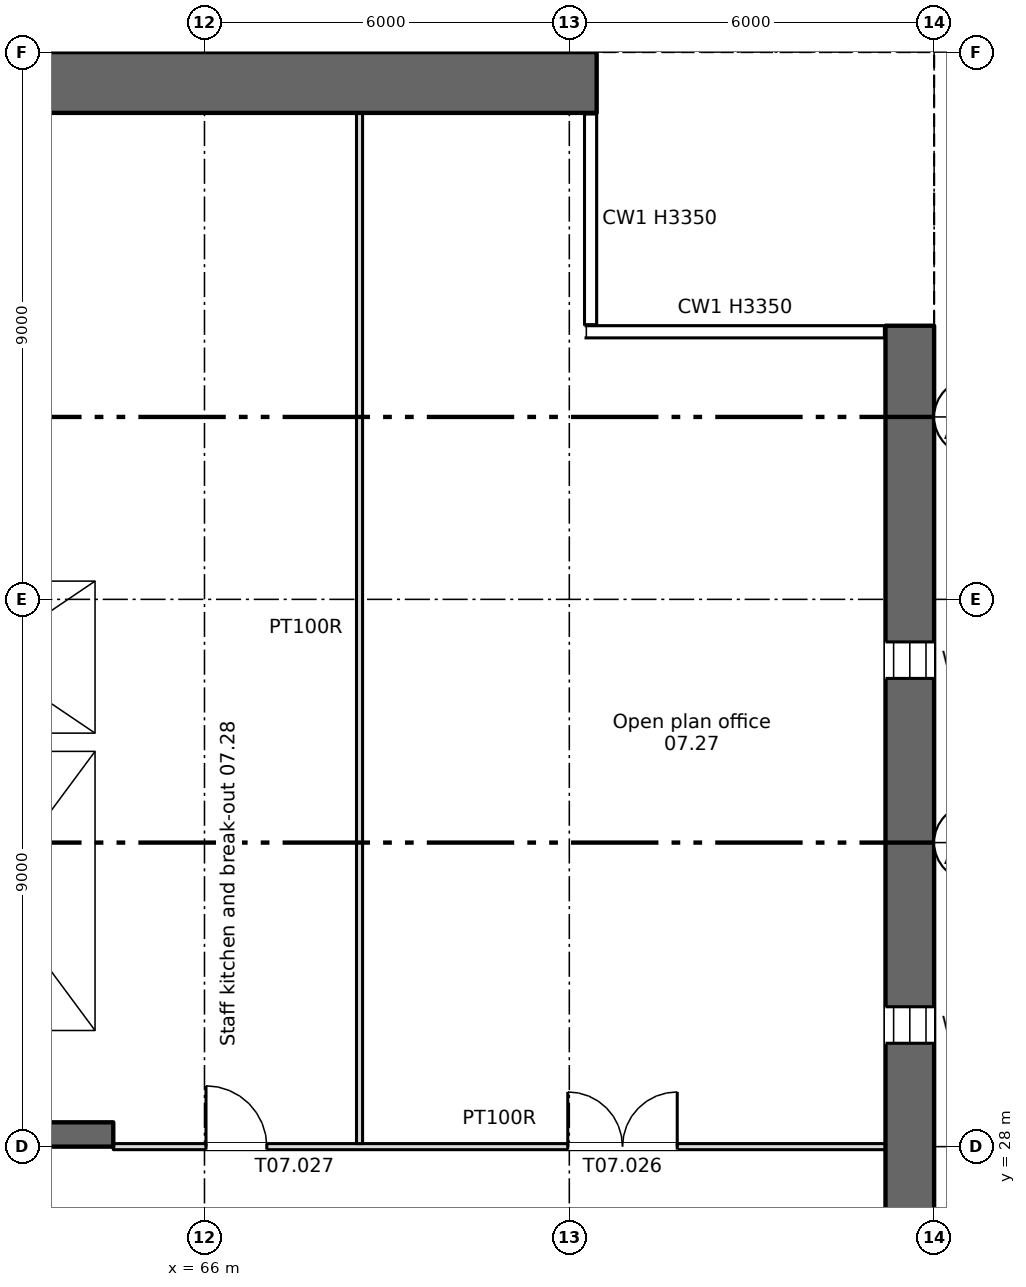
"""IFC4 building model, lengths in metres.
Left out: names, types, materials, properties, quantities, classifications, styles, units other than length and angle.
Written with IfcOpenShell. Run it as: python <this file> out.ifc"""

import sys

from ifc_helpers import new_model, si_unit, direction, frame, frame_2d, origin, place, context, subcontext, project, spatial, rectangle, extrude, element, fill, save


model = new_model("IFC4")
c1 = context("Model", 3, precision=1e-05, world=origin(), true_north=direction((0.0, 1.0)))
c2 = subcontext(c1, "Body", "Model", "MODEL_VIEW")
j1 = project(units=[si_unit("LENGTHUNIT", "METRE"), si_unit("PLANEANGLEUNIT", "RADIAN")], contexts=[c1])
p1 = place(None, origin())
s1 = spatial("IfcSite", under=j1, at=p1, CompositionType="ELEMENT")
p2 = place(p1, origin())
s2 = spatial("IfcBuilding", under=s1, at=p2, CompositionType="ELEMENT")
p3 = place(p2, frame((0.0, 0.0, 26.25)))
s3 = spatial("IfcBuildingStorey", under=s2, at=p3, CompositionType="ELEMENT", Elevation=26.25)
p4 = place(p3, frame((77.6, 4.5, 0.0), z_axis=(0.0, 0.0, 1.0), x_axis=(0.0, 1.0, 0.0)))
e1 = element("IfcWall", 1, at=p4, inside=s3, PredefinedType="SHEAR", context=c2, shape_type="SweptSolid", body=[
    extrude(rectangle(XDim=37.0, YDim=0.8, at=frame_2d((18.5, 0.0))), origin(), (0.0, 0.0, 1.0), 3.35),
])
p5 = place(p4, frame((1.2, 0.0, 0.6)))
e2 = element("IfcOpeningElement", 2, at=p5, cuts=e1, PredefinedType="OPENING", context=c2, shape_type="SweptSolid", body=[
    extrude(rectangle(XDim=0.6, YDim=2.4, at=frame_2d((0.3, 1.2))), frame((0.0, 0.41, 0.0), z_axis=(0.0, -1.0, 0.0), x_axis=(1.0, 0.0, 0.0)), (0.0, 0.0, 1.0), 0.82),
])
p6 = place(p4, frame((7.2, 0.0, 0.6)))
e3 = element("IfcOpeningElement", 3, at=p6, cuts=e1, PredefinedType="OPENING", context=c2, shape_type="SweptSolid", body=[
    extrude(rectangle(XDim=0.6, YDim=2.4, at=frame_2d((0.3, 1.2))), frame((0.0, 0.41, 0.0), z_axis=(0.0, -1.0, 0.0), x_axis=(1.0, 0.0, 0.0)), (0.0, 0.0, 1.0), 0.82),
])
p7 = place(p4, frame((13.2, 0.0, 0.6)))
e4 = element("IfcOpeningElement", 4, at=p7, cuts=e1, PredefinedType="OPENING", context=c2, shape_type="SweptSolid", body=[
    extrude(rectangle(XDim=0.6, YDim=2.4, at=frame_2d((0.3, 1.2))), frame((0.0, 0.41, 0.0), z_axis=(0.0, -1.0, 0.0), x_axis=(1.0, 0.0, 0.0)), (0.0, 0.0, 1.0), 0.82),
])
p8 = place(p4, frame((19.2, 0.0, 0.6)))
e5 = element("IfcOpeningElement", 5, at=p8, cuts=e1, PredefinedType="OPENING", context=c2, shape_type="SweptSolid", body=[
    extrude(rectangle(XDim=0.6, YDim=2.4, at=frame_2d((0.3, 1.2))), frame((0.0, 0.41, 0.0), z_axis=(0.0, -1.0, 0.0), x_axis=(1.0, 0.0, 0.0)), (0.0, 0.0, 1.0), 0.82),
])
p9 = place(p4, frame((25.2, 0.0, 0.6)))
e6 = element("IfcOpeningElement", 6, at=p9, cuts=e1, PredefinedType="OPENING", context=c2, shape_type="SweptSolid", body=[
    extrude(rectangle(XDim=0.6, YDim=2.4, at=frame_2d((0.3, 1.2))), frame((0.0, 0.41, 0.0), z_axis=(0.0, -1.0, 0.0), x_axis=(1.0, 0.0, 0.0)), (0.0, 0.0, 1.0), 0.82),
])
p10 = place(p4, frame((31.2, 0.0, 0.6)))
e7 = element("IfcOpeningElement", 7, at=p10, cuts=e1, PredefinedType="OPENING", context=c2, shape_type="SweptSolid", body=[
    extrude(rectangle(XDim=0.6, YDim=2.4, at=frame_2d((0.3, 1.2))), frame((0.0, 0.41, 0.0), z_axis=(0.0, -1.0, 0.0), x_axis=(1.0, 0.0, 0.0)), (0.0, 0.0, 1.0), 0.82),
])
p11 = place(p3, frame((5.55, 45.5, 0.0), z_axis=(0.0, 0.0, 1.0), x_axis=(1.0, 0.0, 0.0)))
e8 = element("IfcWall", 8, at=p11, inside=s3, PredefinedType="SHEAR", context=c2, shape_type="SweptSolid", body=[
    extrude(rectangle(XDim=66.9, YDim=1.0, at=frame_2d((33.45, 0.0))), origin(), (0.0, 0.0, 1.0), 3.35),
])
p12 = place(p11, frame((1.2, 0.0, 0.6)))
e9 = element("IfcOpeningElement", 9, at=p12, cuts=e8, PredefinedType="OPENING", context=c2, shape_type="SweptSolid", body=[
    extrude(rectangle(XDim=0.6, YDim=2.4, at=frame_2d((0.3, 1.2))), frame((0.0, 0.51, 0.0), z_axis=(0.0, -1.0, 0.0), x_axis=(1.0, 0.0, 0.0)), (0.0, 0.0, 1.0), 1.02),
])
p13 = place(p11, frame((7.2, 0.0, 0.6)))
e10 = element("IfcOpeningElement", 10, at=p13, cuts=e8, PredefinedType="OPENING", context=c2, shape_type="SweptSolid", body=[
    extrude(rectangle(XDim=0.6, YDim=2.4, at=frame_2d((0.3, 1.2))), frame((0.0, 0.51, 0.0), z_axis=(0.0, -1.0, 0.0), x_axis=(1.0, 0.0, 0.0)), (0.0, 0.0, 1.0), 1.02),
])
p14 = place(p3, frame((6.7, 28.2, 0.0), z_axis=(0.0, 0.0, 1.0), x_axis=(1.0, 0.0, 0.0)))
e11 = element("IfcWall", 11, at=p14, inside=s3, PredefinedType="SHEAR", context=c2, shape_type="SweptSolid", body=[
    extrude(rectangle(XDim=57.8, YDim=0.4, at=frame_2d((28.9, 0.0))), origin(), (0.0, 0.0, 1.0), 3.35),
])
p15 = place(p14, frame((12.562, 0.0, 0.0)))
e12 = element("IfcOpeningElement", 12, at=p15, cuts=e11, PredefinedType="OPENING", context=c2, shape_type="SweptSolid", body=[
    extrude(rectangle(XDim=0.9, YDim=2.1, at=frame_2d((0.45, 1.05))), frame((0.0, 0.21, 0.0), z_axis=(0.0, -1.0, 0.0), x_axis=(1.0, 0.0, 0.0)), (0.0, 0.0, 1.0), 0.42),
])
p16 = place(p14, frame((15.137, 0.0, 0.0)))
e13 = element("IfcOpeningElement", 13, at=p16, cuts=e11, PredefinedType="OPENING", context=c2, shape_type="SweptSolid", body=[
    extrude(rectangle(XDim=0.9, YDim=2.1, at=frame_2d((0.45, 1.05))), frame((0.0, 0.21, 0.0), z_axis=(0.0, -1.0, 0.0), x_axis=(1.0, 0.0, 0.0)), (0.0, 0.0, 1.0), 0.42),
])
p17 = place(p14, frame((49.85, 0.0, 0.0)))
e14 = element("IfcOpeningElement", 14, at=p17, cuts=e11, PredefinedType="OPENING", context=c2, shape_type="SweptSolid", body=[
    extrude(rectangle(XDim=0.9, YDim=2.1, at=frame_2d((0.45, 1.05))), frame((0.0, 0.21, 0.0), z_axis=(0.0, -1.0, 0.0), x_axis=(1.0, 0.0, 0.0)), (0.0, 0.0, 1.0), 0.42),
])
p18 = place(p14, frame((0.562, 0.0, 0.0)))
e15 = element("IfcOpeningElement", 15, at=p18, cuts=e11, PredefinedType="OPENING", context=c2, shape_type="SweptSolid", body=[
    extrude(rectangle(XDim=0.9, YDim=2.1, at=frame_2d((0.45, 1.05))), frame((0.0, 0.21, 0.0), z_axis=(0.0, -1.0, 0.0), x_axis=(1.0, 0.0, 0.0)), (0.0, 0.0, 1.0), 0.42),
])
p19 = place(p14, frame((2.137, 0.0, 0.0)))
e16 = element("IfcOpeningElement", 16, at=p19, cuts=e11, PredefinedType="OPENING", context=c2, shape_type="SweptSolid", body=[
    extrude(rectangle(XDim=0.9, YDim=2.1, at=frame_2d((0.45, 1.05))), frame((0.0, 0.21, 0.0), z_axis=(0.0, -1.0, 0.0), x_axis=(1.0, 0.0, 0.0)), (0.0, 0.0, 1.0), 0.42),
])
p20 = place(p14, frame((4.7, 0.0, 0.0)))
e17 = element("IfcOpeningElement", 17, at=p20, cuts=e11, PredefinedType="OPENING", context=c2, shape_type="SweptSolid", body=[
    extrude(rectangle(XDim=1.2, YDim=2.1, at=frame_2d((0.6, 1.05))), frame((0.0, 0.21, 0.0), z_axis=(0.0, -1.0, 0.0), x_axis=(1.0, 0.0, 0.0)), (0.0, 0.0, 1.0), 0.42),
])
p21 = place(p14, frame((31.7, 0.0, 0.0)))
e18 = element("IfcOpeningElement", 18, at=p21, cuts=e11, PredefinedType="OPENING", context=c2, shape_type="SweptSolid", body=[
    extrude(rectangle(XDim=1.2, YDim=2.1, at=frame_2d((0.6, 1.05))), frame((0.0, 0.21, 0.0), z_axis=(0.0, -1.0, 0.0), x_axis=(1.0, 0.0, 0.0)), (0.0, 0.0, 1.0), 0.42),
])
p22 = place(p14, frame((55.2, 0.0, 0.0)))
e19 = element("IfcOpeningElement", 19, at=p22, cuts=e11, PredefinedType="OPENING", context=c2, shape_type="SweptSolid", body=[
    extrude(rectangle(XDim=1.2, YDim=2.1, at=frame_2d((0.6, 1.05))), frame((0.0, 0.21, 0.0), z_axis=(0.0, -1.0, 0.0), x_axis=(1.0, 0.0, 0.0)), (0.0, 0.0, 1.0), 0.42),
])
p23 = place(p14, frame((21.7, 0.0, 0.0)))
e20 = element("IfcOpeningElement", 20, at=p23, cuts=e11, PredefinedType="OPENING", context=c2, shape_type="SweptSolid", body=[
    extrude(rectangle(XDim=1.2, YDim=2.1, at=frame_2d((0.6, 1.05))), frame((0.0, 0.21, 0.0), z_axis=(0.0, -1.0, 0.0), x_axis=(1.0, 0.0, 0.0)), (0.0, 0.0, 1.0), 0.42),
])
p24 = place(p14, frame((41.7, 0.0, 0.0)))
e21 = element("IfcOpeningElement", 21, at=p24, cuts=e11, PredefinedType="OPENING", context=c2, shape_type="SweptSolid", body=[
    extrude(rectangle(XDim=1.2, YDim=2.1, at=frame_2d((0.6, 1.05))), frame((0.0, 0.21, 0.0), z_axis=(0.0, -1.0, 0.0), x_axis=(1.0, 0.0, 0.0)), (0.0, 0.0, 1.0), 0.42),
])
p25 = place(p14, frame((24.85, 0.0, 0.0)))
e22 = element("IfcOpeningElement", 22, at=p25, cuts=e11, PredefinedType="OPENING", context=c2, shape_type="SweptSolid", body=[
    extrude(rectangle(XDim=2.4, YDim=2.1, at=frame_2d((1.2, 1.05))), frame((0.0, 0.21, 0.0), z_axis=(0.0, -1.0, 0.0), x_axis=(1.0, 0.0, 0.0)), (0.0, 0.0, 1.0), 0.42),
])
p26 = place(p14, frame((37.35, 0.0, 0.0)))
e23 = element("IfcOpeningElement", 23, at=p26, cuts=e11, PredefinedType="OPENING", context=c2, shape_type="SweptSolid", body=[
    extrude(rectangle(XDim=2.4, YDim=2.1, at=frame_2d((1.2, 1.05))), frame((0.0, 0.21, 0.0), z_axis=(0.0, -1.0, 0.0), x_axis=(1.0, 0.0, 0.0)), (0.0, 0.0, 1.0), 0.42),
])
p27 = place(p14, frame((7.85, 0.0, 0.0)))
e24 = element("IfcOpeningElement", 24, at=p27, cuts=e11, PredefinedType="OPENING", context=c2, shape_type="SweptSolid", body=[
    extrude(rectangle(XDim=2.4, YDim=2.1, at=frame_2d((1.2, 1.05))), frame((0.0, 0.21, 0.0), z_axis=(0.0, -1.0, 0.0), x_axis=(1.0, 0.0, 0.0)), (0.0, 0.0, 1.0), 0.42),
])
p28 = place(p14, frame((28.85, 0.0, 0.0)))
e25 = element("IfcOpeningElement", 25, at=p28, cuts=e11, PredefinedType="OPENING", context=c2, shape_type="SweptSolid", body=[
    extrude(rectangle(XDim=0.9, YDim=2.1, at=frame_2d((0.45, 1.05))), frame((0.0, 0.21, 0.0), z_axis=(0.0, -1.0, 0.0), x_axis=(1.0, 0.0, 0.0)), (0.0, 0.0, 1.0), 0.42),
])
p29 = place(p14, frame((34.85, 0.0, 0.0)))
e26 = element("IfcOpeningElement", 26, at=p29, cuts=e11, PredefinedType="OPENING", context=c2, shape_type="SweptSolid", body=[
    extrude(rectangle(XDim=0.9, YDim=2.1, at=frame_2d((0.45, 1.05))), frame((0.0, 0.21, 0.0), z_axis=(0.0, -1.0, 0.0), x_axis=(1.0, 0.0, 0.0)), (0.0, 0.0, 1.0), 0.42),
])
p30 = place(p3, frame((64.35, 34.8, 0.0), z_axis=(0.0, 0.0, 1.0), x_axis=(0.0, 1.0, 0.0)))
e27 = element("IfcWall", 27, at=p30, inside=s3, PredefinedType="SHEAR", context=c2, shape_type="SweptSolid", body=[
    extrude(rectangle(XDim=10.2, YDim=0.3, at=frame_2d((5.1, 0.0))), origin(), (0.0, 0.0, 1.0), 3.35),
])
p31 = place(p3, frame((64.35, 28.4, 0.0), z_axis=(0.0, 0.0, 1.0), x_axis=(0.0, 1.0, 0.0)))
e28 = element("IfcWall", 28, at=p31, inside=s3, PredefinedType="SHEAR", context=c2, shape_type="SweptSolid", body=[
    extrude(rectangle(XDim=6.1, YDim=0.3, at=frame_2d((3.05, 0.0))), origin(), (0.0, 0.0, 1.0), 3.35),
])
p32 = place(p3, frame((60.5, 34.65, 0.0), z_axis=(0.0, 0.0, 1.0), x_axis=(1.0, 0.0, 0.0)))
e29 = element("IfcWall", 29, at=p32, inside=s3, PredefinedType="SHEAR", context=c2, shape_type="SweptSolid", body=[
    extrude(rectangle(XDim=4.0, YDim=0.3, at=frame_2d((2.0, 0.0))), origin(), (0.0, 0.0, 1.0), 3.35),
])
p33 = place(p3, frame((60.5, 37.45, 0.0), z_axis=(0.0, 0.0, 1.0), x_axis=(1.0, 0.0, 0.0)))
e30 = element("IfcWall", 30, at=p33, inside=s3, PredefinedType="SHEAR", context=c2, shape_type="SweptSolid", body=[
    extrude(rectangle(XDim=3.7, YDim=0.3, at=frame_2d((1.85, 0.0))), origin(), (0.0, 0.0, 1.0), 3.35),
])
p34 = place(p33, frame((1.3, 0.0, 0.0)))
e31 = element("IfcOpeningElement", 31, at=p34, cuts=e30, PredefinedType="OPENING", context=c2, shape_type="SweptSolid", body=[
    extrude(rectangle(XDim=1.1, YDim=2.1, at=frame_2d((0.55, 1.05))), frame((0.0, 0.16, 0.0), z_axis=(0.0, -1.0, 0.0), x_axis=(1.0, 0.0, 0.0)), (0.0, 0.0, 1.0), 0.32),
])
p35 = place(p3, frame((64.5, 28.0, 0.0), z_axis=(0.0, 0.0, 1.0), x_axis=(1.0, 0.0, 0.0)))
e32 = element("IfcWall", 32, at=p35, inside=s3, PredefinedType="PARTITIONING", context=c2, shape_type="SweptSolid", body=[
    extrude(rectangle(XDim=12.7, YDim=0.1, at=frame_2d((6.35, 0.0))), origin(), (0.0, 0.0, 1.0), 3.35),
])
p36 = place(p35, frame((7.475, 0.0, 0.0)))
e33 = element("IfcOpeningElement", 33, at=p36, cuts=e32, PredefinedType="OPENING", context=c2, shape_type="SweptSolid", body=[
    extrude(rectangle(XDim=1.8, YDim=2.1, at=frame_2d((0.9, 1.05))), frame((0.0, 0.06, 0.0), z_axis=(0.0, -1.0, 0.0), x_axis=(1.0, 0.0, 0.0)), (0.0, 0.0, 1.0), 0.12),
])
p37 = place(p35, frame((1.525, 0.0, 0.0)))
e34 = element("IfcOpeningElement", 34, at=p37, cuts=e32, PredefinedType="OPENING", context=c2, shape_type="SweptSolid", body=[
    extrude(rectangle(XDim=1.0, YDim=2.1, at=frame_2d((0.5, 1.05))), frame((0.0, 0.06, 0.0), z_axis=(0.0, -1.0, 0.0), x_axis=(1.0, 0.0, 0.0)), (0.0, 0.0, 1.0), 0.12),
])
p38 = place(p3, frame((68.55, 28.05, 0.0), z_axis=(0.0, 0.0, 1.0), x_axis=(0.0, 1.0, 0.0)))
e35 = element("IfcWall", 35, at=p38, inside=s3, PredefinedType="PARTITIONING", context=c2, shape_type="SweptSolid", body=[
    extrude(rectangle(XDim=16.95, YDim=0.1, at=frame_2d((8.475, 0.0))), origin(), (0.0, 0.0, 1.0), 3.35),
])
p39 = place(p9, origin())
e36 = element("IfcWindow", 36, at=p39, inside=s3, PartitioningType="SINGLE_PANEL", PredefinedType="WINDOW", context=c2, shape_type="SweptSolid", body=[
    extrude(rectangle(XDim=0.6, YDim=2.4, at=frame_2d((0.3, 1.2))), frame((0.0, 0.03, 0.0), z_axis=(0.0, -1.0, 0.0), x_axis=(1.0, 0.0, 0.0)), (0.0, 0.0, 1.0), 0.06),
])
fill(e6, e36)
p40 = place(p10, origin())
e37 = element("IfcWindow", 37, at=p40, inside=s3, PartitioningType="SINGLE_PANEL", PredefinedType="WINDOW", context=c2, shape_type="SweptSolid", body=[
    extrude(rectangle(XDim=0.6, YDim=2.4, at=frame_2d((0.3, 1.2))), frame((0.0, 0.03, 0.0), z_axis=(0.0, -1.0, 0.0), x_axis=(1.0, 0.0, 0.0)), (0.0, 0.0, 1.0), 0.06),
])
fill(e7, e37)
p41 = place(p36, origin())
e38 = element("IfcDoor", 38, at=p41, inside=s3, OperationType="DOUBLE_DOOR_SINGLE_SWING", PredefinedType="DOOR", context=c2, shape_type="SweptSolid", body=[
    extrude(rectangle(XDim=1.8, YDim=2.1, at=frame_2d((0.9, 1.05))), frame((0.0, 0.025, 0.0), z_axis=(0.0, -1.0, 0.0), x_axis=(1.0, 0.0, 0.0)), (0.0, 0.0, 1.0), 0.05),
])
fill(e33, e38)
p42 = place(p37, origin())
e39 = element("IfcDoor", 39, at=p42, inside=s3, OperationType="SINGLE_SWING_LEFT", PredefinedType="DOOR", context=c2, shape_type="SweptSolid", body=[
    extrude(rectangle(XDim=1.0, YDim=2.1, at=frame_2d((0.5, 1.05))), frame((0.0, 0.025, 0.0), z_axis=(0.0, -1.0, 0.0), x_axis=(1.0, 0.0, 0.0)), (0.0, 0.0, 1.0), 0.05),
])
fill(e34, e39)
save(model, sys.argv[1])
